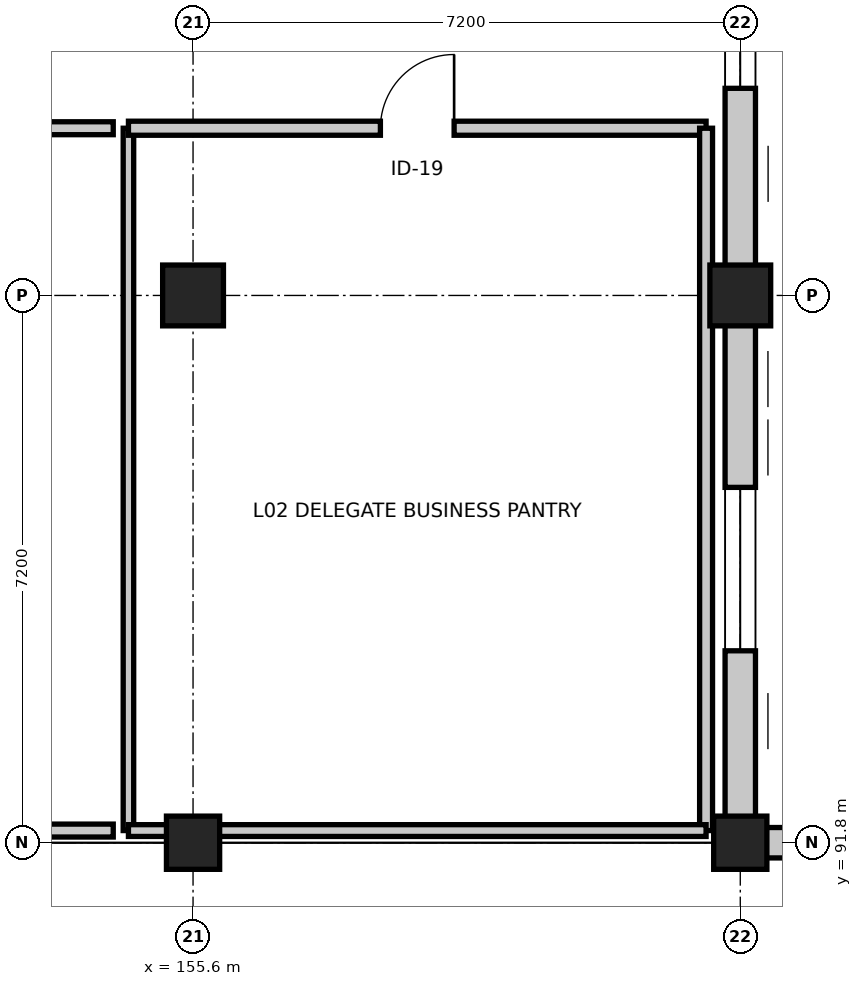
"""IFC4 building model, lengths in metres.
Left out: names, types, materials, properties, quantities, classifications, styles, units other than length and angle.
Written with IfcOpenShell. Run it as: python <this file> out.ifc"""

import sys

from ifc_helpers import new_model, si_unit, direction, frame, frame_2d, origin, origin_2d, place, context, subcontext, project, spatial, rectangle, extrude, element, fill, save


model = new_model("IFC4")
c1 = context("Model", 3, precision=1e-05, world=origin(), true_north=direction((0.0, 1.0)))
c2 = subcontext(c1, "Body", "Model", "MODEL_VIEW")
j1 = project(units=[si_unit("LENGTHUNIT", "METRE"), si_unit("PLANEANGLEUNIT", "RADIAN")], contexts=[c1])
p1 = place(None, origin())
s1 = spatial("IfcSite", under=j1, at=p1, CompositionType="ELEMENT")
p2 = place(p1, origin())
s2 = spatial("IfcBuilding", under=s1, at=p2, CompositionType="ELEMENT")
p3 = place(p2, frame((0.0, 0.0, 10.5)))
s3 = spatial("IfcBuildingStorey", under=s2, at=p3, CompositionType="ELEMENT", Elevation=10.5)
p4 = place(p3, frame((155.6, 91.8, 0.0), z_axis=(0.0, 0.0, 1.0), x_axis=(1.0, 0.0, 0.0)))
e1 = element("IfcColumn", 1, at=p4, inside=s3, PredefinedType="COLUMN", context=c2, shape_type="SweptSolid", body=[
    extrude(rectangle(XDim=0.7, YDim=0.7, at=origin_2d()), origin(), (0.0, 0.0, 1.0), 4.5),
])
p5 = place(p3, frame((155.6, 99.0, 0.0), z_axis=(0.0, 0.0, 1.0), x_axis=(1.0, 0.0, 0.0)))
e2 = element("IfcColumn", 2, at=p5, inside=s3, PredefinedType="COLUMN", context=c2, shape_type="SweptSolid", body=[
    extrude(rectangle(XDim=0.8, YDim=0.8, at=origin_2d()), origin(), (0.0, 0.0, 1.0), 4.5),
])
p6 = place(p3, frame((162.8, 91.8, 0.0), z_axis=(0.0, 0.0, 1.0), x_axis=(1.0, 0.0, 0.0)))
e3 = element("IfcColumn", 3, at=p6, inside=s3, PredefinedType="COLUMN", context=c2, shape_type="SweptSolid", body=[
    extrude(rectangle(XDim=0.7, YDim=0.7, at=origin_2d()), origin(), (0.0, 0.0, 1.0), 4.5),
])
p7 = place(p3, frame((162.8, 99.0, 0.0), z_axis=(0.0, 0.0, 1.0), x_axis=(1.0, 0.0, 0.0)))
e4 = element("IfcColumn", 4, at=p7, inside=s3, PredefinedType="COLUMN", context=c2, shape_type="SweptSolid", body=[
    extrude(rectangle(XDim=0.8, YDim=0.8, at=origin_2d()), origin(), (0.0, 0.0, 1.0), 4.5),
])
p8 = place(p3, frame((162.8, 106.2, 0.0), z_axis=(0.0, 0.0, 1.0), x_axis=(0.0, -1.0, 0.0)))
e5 = element("IfcWall", 5, at=p8, inside=s3, PredefinedType="STANDARD", context=c2, shape_type="SweptSolid", body=[
    extrude(rectangle(XDim=7.2, YDim=0.4, at=frame_2d((3.6, 0.0))), origin(), (0.0, 0.0, 1.0), 3.555),
])
p9 = place(p8, frame((2.725, 0.0, 0.9)))
e6 = element("IfcOpeningElement", 6, at=p9, cuts=e5, PredefinedType="OPENING", context=c2, shape_type="SweptSolid", body=[
    extrude(rectangle(XDim=1.75, YDim=2.2, at=frame_2d((0.875, 1.1))), frame((0.0, 0.21, 0.0), z_axis=(0.0, -1.0, 0.0), x_axis=(1.0, 0.0, 0.0)), (0.0, 0.0, 1.0), 0.42),
])
p10 = place(p3, frame((162.8, 99.0, 0.0), z_axis=(0.0, 0.0, 1.0), x_axis=(0.0, -1.0, 0.0)))
e7 = element("IfcWall", 7, at=p10, inside=s3, PredefinedType="STANDARD", context=c2, shape_type="SweptSolid", body=[
    extrude(rectangle(XDim=7.2, YDim=0.4, at=frame_2d((3.6, 0.0))), origin(), (0.0, 0.0, 1.0), 3.555),
])
p11 = place(p10, frame((2.525, 0.0, 0.9)))
e8 = element("IfcOpeningElement", 8, at=p11, cuts=e7, PredefinedType="OPENING", context=c2, shape_type="SweptSolid", body=[
    extrude(rectangle(XDim=2.15, YDim=2.2, at=frame_2d((1.075, 1.1))), frame((0.0, 0.21, 0.0), z_axis=(0.0, -1.0, 0.0), x_axis=(1.0, 0.0, 0.0)), (0.0, 0.0, 1.0), 0.42),
])
p12 = place(p3, frame((162.8, 91.8, 0.0), z_axis=(0.0, 0.0, 1.0), x_axis=(1.0, 0.0, 0.0)))
e9 = element("IfcWall", 9, at=p12, inside=s3, PredefinedType="STANDARD", context=c2, shape_type="SweptSolid", body=[
    extrude(rectangle(XDim=7.2, YDim=0.4, at=frame_2d((3.6, 0.0))), origin(), (0.0, 0.0, 1.0), 3.455),
])
p13 = place(p12, frame((2.3, 0.0, 0.9)))
e10 = element("IfcOpeningElement", 10, at=p13, cuts=e9, PredefinedType="OPENING", context=c2, shape_type="SweptSolid", body=[
    extrude(rectangle(XDim=2.6, YDim=2.2, at=frame_2d((1.3, 1.1))), frame((0.0, 0.21, 0.0), z_axis=(0.0, -1.0, 0.0), x_axis=(1.0, 0.0, 0.0)), (0.0, 0.0, 1.0), 0.42),
])
p14 = place(p3, frame((154.75, 91.96, 0.0), z_axis=(0.0, 0.0, 1.0), x_axis=(0.0, 1.0, 0.0)))
e11 = element("IfcWall", 11, at=p14, inside=s3, PredefinedType="PARTITIONING", context=c2, shape_type="SweptSolid", body=[
    extrude(rectangle(XDim=9.24, YDim=0.138, at=frame_2d((4.62, 0.0))), origin(), (0.0, 0.0, 1.0), 3.455),
])
p15 = place(p3, frame((154.75, 101.2, 0.0), z_axis=(0.0, 0.0, 1.0), x_axis=(1.0, 0.0, 0.0)))
e12 = element("IfcWall", 12, at=p15, inside=s3, PredefinedType="PARTITIONING", context=c2, shape_type="SweptSolid", body=[
    extrude(rectangle(XDim=7.6, YDim=0.185, at=frame_2d((3.8, 0.0))), origin(), (0.0, 0.0, 1.0), 3.555),
])
p16 = place(p15, frame((3.315, 0.0, 0.0)))
e13 = element("IfcOpeningElement", 13, at=p16, cuts=e12, PredefinedType="OPENING", context=c2, shape_type="SweptSolid", body=[
    extrude(rectangle(XDim=0.97, YDim=2.16, at=frame_2d((0.485, 1.08))), frame((0.0, 0.103, 0.0), z_axis=(0.0, -1.0, 0.0), x_axis=(1.0, 0.0, 0.0)), (0.0, 0.0, 1.0), 0.205),
])
p17 = place(p3, frame((162.35, 101.2, 0.0), z_axis=(0.0, 0.0, 1.0), x_axis=(0.0, -1.0, 0.0)))
e14 = element("IfcWall", 14, at=p17, inside=s3, PredefinedType="PARTITIONING", context=c2, shape_type="SweptSolid", body=[
    extrude(rectangle(XDim=9.24, YDim=0.17, at=frame_2d((4.62, 0.0))), origin(), (0.0, 0.0, 1.0), 3.455),
])
p18 = place(p3, frame((162.35, 91.96, 0.0), z_axis=(0.0, 0.0, 1.0), x_axis=(-1.0, 0.0, 0.0)))
e15 = element("IfcWall", 15, at=p18, inside=s3, PredefinedType="PARTITIONING", context=c2, shape_type="SweptSolid", body=[
    extrude(rectangle(XDim=7.6, YDim=0.155, at=frame_2d((3.8, 0.0))), origin(), (0.0, 0.0, 1.0), 3.455),
])
p19 = place(p3, frame((154.55, 91.96, 0.0), z_axis=(0.0, 0.0, 1.0), x_axis=(-1.0, 0.0, 0.0)))
e16 = element("IfcWall", 16, at=p19, inside=s3, PredefinedType="PARTITIONING", context=c2, shape_type="SweptSolid", body=[
    extrude(rectangle(XDim=27.14, YDim=0.17, at=frame_2d((13.57, 0.0))), origin(), (0.0, 0.0, 1.0), 3.455),
])
p20 = place(p3, frame((138.21, 101.2, 0.0), z_axis=(0.0, 0.0, 1.0), x_axis=(1.0, 0.0, 0.0)))
e17 = element("IfcWall", 17, at=p20, inside=s3, PredefinedType="PARTITIONING", context=c2, shape_type="SweptSolid", body=[
    extrude(rectangle(XDim=16.34, YDim=0.17, at=frame_2d((8.17, 0.0))), origin(), (0.0, 0.0, 1.0), 3.555),
])
p21 = place(p9, origin())
e18 = element("IfcWindow", 18, at=p21, inside=s3, PartitioningType="SINGLE_PANEL", PredefinedType="WINDOW", context=c2, shape_type="SweptSolid", body=[
    extrude(rectangle(XDim=1.75, YDim=2.2, at=frame_2d((0.875, 1.1))), frame((0.0, 0.03, 0.0), z_axis=(0.0, -1.0, 0.0), x_axis=(1.0, 0.0, 0.0)), (0.0, 0.0, 1.0), 0.06),
])
fill(e6, e18)
p22 = place(p11, origin())
e19 = element("IfcWindow", 19, at=p22, inside=s3, PartitioningType="SINGLE_PANEL", PredefinedType="WINDOW", context=c2, shape_type="SweptSolid", body=[
    extrude(rectangle(XDim=2.15, YDim=2.2, at=frame_2d((1.075, 1.1))), frame((0.0, 0.03, 0.0), z_axis=(0.0, -1.0, 0.0), x_axis=(1.0, 0.0, 0.0)), (0.0, 0.0, 1.0), 0.06),
])
fill(e8, e19)
p23 = place(p16, origin())
e20 = element("IfcDoor", 20, at=p23, inside=s3, OperationType="SINGLE_SWING_RIGHT", PredefinedType="DOOR", context=c2, shape_type="SweptSolid", body=[
    extrude(rectangle(XDim=0.97, YDim=2.16, at=frame_2d((0.485, 1.08))), frame((0.0, 0.025, 0.0), z_axis=(0.0, -1.0, 0.0), x_axis=(1.0, 0.0, 0.0)), (0.0, 0.0, 1.0), 0.05),
])
fill(e13, e20)
save(model, sys.argv[1])
